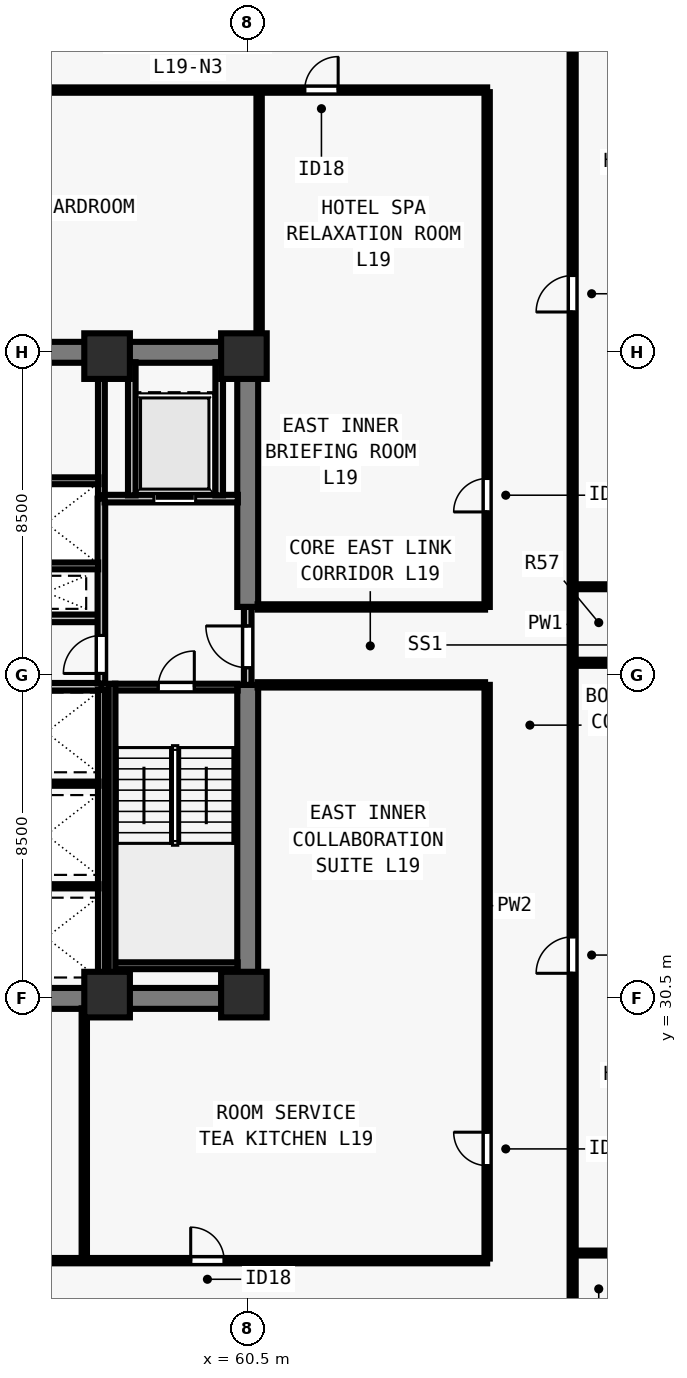
"""IFC4 building model, lengths in metres.
Left out: names, types, materials, properties, quantities, classifications, styles, units other than length and angle.
Written with IfcOpenShell. Run it as: python <this file> out.ifc"""

import sys

from ifc_helpers import new_model, si_unit, direction, frame, frame_2d, origin, origin_2d, place, context, subcontext, project, spatial, rectangle, extrude, element, fill, save


model = new_model("IFC4")
c1 = context("Model", 3, precision=1e-05, world=origin(), true_north=direction((0.0, 1.0)))
c2 = subcontext(c1, "Body", "Model", "MODEL_VIEW")
j1 = project(units=[si_unit("LENGTHUNIT", "METRE"), si_unit("PLANEANGLEUNIT", "RADIAN")], contexts=[c1])
p1 = place(None, origin())
s1 = spatial("IfcSite", under=j1, at=p1, CompositionType="ELEMENT")
p2 = place(p1, origin())
s2 = spatial("IfcBuilding", under=s1, at=p2, CompositionType="ELEMENT")
p3 = place(p2, frame((0.0, 0.0, 72.5)))
s3 = spatial("IfcBuildingStorey", under=s2, at=p3, CompositionType="ELEMENT", Elevation=72.5)
for number, where, z_axis, x_axis in (
    (1, (56.8, 30.6, 0.0), (0.0, 0.0, 1.0), (1.0, 0.0, 0.0)),
    (2, (60.4, 30.6, 0.0), (0.0, 0.0, 1.0), (1.0, 0.0, 0.0)),
    (3, (56.8, 47.4, 0.0), (0.0, 0.0, 1.0), (1.0, 0.0, 0.0)),
    (4, (60.4, 47.4, 0.0), (0.0, 0.0, 1.0), (1.0, 0.0, 0.0)),
):
    element("IfcColumn", number, at=place(p3, frame(where, z_axis=z_axis, x_axis=x_axis)), inside=s3, PredefinedType="COLUMN", context=c2, shape_type="SweptSolid", body=[
        extrude(rectangle(XDim=1.2, YDim=1.2, at=origin_2d()), origin(), (0.0, 0.0, 1.0), 3.5),
    ])
for number, where, z_axis, x_axis in (
    (5, (43.225, 30.5, 0.0), (0.0, 0.0, 1.0), (1.0, 0.0, 0.0)),
    (6, (43.225, 47.5, 0.0), (0.0, 0.0, 1.0), (1.0, 0.0, 0.0)),
):
    element("IfcWall", number, at=place(p3, frame(where, z_axis=z_axis, x_axis=x_axis)), inside=s3, PredefinedType="SHEAR", context=c2, shape_type="SweptSolid", body=[
        extrude(rectangle(XDim=17.55, YDim=0.55, at=frame_2d((8.775, 0.0))), origin(), (0.0, 0.0, 1.0), 3.28),
    ])
p4 = place(p3, frame((60.5, 30.765, 0.0), z_axis=(0.0, 0.0, 1.0), x_axis=(0.0, 1.0, 0.0)))
e7 = element("IfcWall", 7, at=p4, inside=s3, PredefinedType="SHEAR", context=c2, shape_type="SweptSolid", body=[
    extrude(rectangle(XDim=7.985, YDim=0.55, at=frame_2d((3.993, 0.0))), origin(), (0.0, 0.0, 1.0), 3.28),
])
p5 = place(p3, frame((60.5, 40.8, 0.0), z_axis=(0.0, 0.0, 1.0), x_axis=(0.0, 1.0, 0.0)))
e8 = element("IfcWall", 8, at=p5, inside=s3, PredefinedType="SHEAR", context=c2, shape_type="SweptSolid", body=[
    extrude(rectangle(XDim=6.435, YDim=0.55, at=frame_2d((3.218, 0.0))), origin(), (0.0, 0.0, 1.0), 3.28),
])
for number, where, z_axis, x_axis in (
    (9, (53.7, 38.7, 0.0), (0.0, 0.0, 1.0), (1.0, 0.0, 0.0)),
    (10, (53.7, 40.5, 0.0), (0.0, 0.0, 1.0), (1.0, 0.0, 0.0)),
):
    element("IfcWall", number, at=place(p3, frame(where, z_axis=z_axis, x_axis=x_axis)), inside=s3, PredefinedType="SOLIDWALL", context=c2, shape_type="SweptSolid", body=[
        extrude(rectangle(XDim=2.95, YDim=0.2, at=frame_2d((1.475, 0.0))), origin(), (0.0, 0.0, 1.0), 3.28),
    ])
p6 = place(p3, frame((60.5, 38.75, 0.0), z_axis=(0.0, 0.0, 1.0), x_axis=(0.0, 1.0, 0.0)))
e11 = element("IfcWall", 11, at=p6, inside=s3, PredefinedType="SOLIDWALL", context=c2, shape_type="SweptSolid", body=[
    extrude(rectangle(XDim=2.05, YDim=0.2, at=frame_2d((1.025, 0.0))), origin(), (0.0, 0.0, 1.0), 3.28),
])
p7 = place(p6, frame((0.45, 0.0, 0.0)))
e12 = element("IfcOpeningElement", 12, at=p7, cuts=e11, PredefinedType="OPENING", context=c2, shape_type="SweptSolid", body=[
    extrude(rectangle(XDim=1.1, YDim=2.15, at=frame_2d((0.55, 1.075))), frame((0.0, 0.11, 0.0), z_axis=(0.0, -1.0, 0.0), x_axis=(1.0, 0.0, 0.0)), (0.0, 0.0, 1.0), 0.22),
])
p8 = place(p3, frame((56.65, 38.785, 0.0), z_axis=(0.0, 0.0, 1.0), x_axis=(0.0, 1.0, 0.0)))
e13 = element("IfcWall", 13, at=p8, inside=s3, PredefinedType="SOLIDWALL", context=c2, shape_type="SweptSolid", body=[
    extrude(rectangle(XDim=4.865, YDim=0.2, at=frame_2d((2.433, 0.0))), origin(), (0.0, 0.0, 1.0), 3.28),
])
p9 = place(p8, frame((0.265, 0.0, 0.0)))
e14 = element("IfcOpeningElement", 14, at=p9, cuts=e13, PredefinedType="OPENING", context=c2, shape_type="SweptSolid", body=[
    extrude(rectangle(XDim=1.0, YDim=2.15, at=frame_2d((0.5, 1.075))), frame((0.0, 0.11, 0.0), z_axis=(0.0, -1.0, 0.0), x_axis=(1.0, 0.0, 0.0)), (0.0, 0.0, 1.0), 0.22),
])
p10 = place(p3, frame((56.735, 43.65, 0.0), z_axis=(0.0, 0.0, 1.0), x_axis=(1.0, 0.0, 0.0)))
e15 = element("IfcWall", 15, at=p10, inside=s3, PredefinedType="SOLIDWALL", context=c2, shape_type="SweptSolid", body=[
    extrude(rectangle(XDim=3.505, YDim=0.2, at=frame_2d((1.752, 0.0))), origin(), (0.0, 0.0, 1.0), 3.28),
])
p11 = place(p10, frame((1.295, 0.0, 0.0)))
e16 = element("IfcOpeningElement", 16, at=p11, cuts=e15, PredefinedType="OPENING", context=c2, shape_type="SweptSolid", body=[
    extrude(rectangle(XDim=1.1, YDim=2.2, at=frame_2d((0.55, 1.1))), frame((0.0, 0.11, 0.0), z_axis=(0.0, -1.0, 0.0), x_axis=(1.0, 0.0, 0.0)), (0.0, 0.0, 1.0), 0.22),
])
for number, where, z_axis, x_axis in (
    (17, (57.45, 43.735, 0.0), (0.0, 0.0, 1.0), (0.0, 1.0, 0.0)),
    (18, (59.75, 43.735, 0.0), (0.0, 0.0, 1.0), (0.0, 1.0, 0.0)),
):
    element("IfcWall", number, at=place(p3, frame(where, z_axis=z_axis, x_axis=x_axis)), inside=s3, PredefinedType="SOLIDWALL", context=c2, shape_type="SweptSolid", body=[
        extrude(rectangle(XDim=3.505, YDim=0.2, at=frame_2d((1.752, 0.0))), origin(), (0.0, 0.0, 1.0), 3.28),
    ])
p12 = place(p3, frame((56.65, 30.76, 0.0), z_axis=(0.0, 0.0, 1.0), x_axis=(0.0, 1.0, 0.0)))
e19 = element("IfcWall", 19, at=p12, inside=s3, PredefinedType="SOLIDWALL", context=c2, shape_type="SweptSolid", body=[
    extrude(rectangle(XDim=7.855, YDim=0.18, at=frame_2d((3.927, 0.0))), origin(), (0.0, 0.0, 1.0), 3.28),
])
for number, where, z_axis, x_axis in (
    (20, (53.785, 33.45, 0.0), (0.0, 0.0, 1.0), (1.0, 0.0, 0.0)),
    (21, (53.785, 36.15, 0.0), (0.0, 0.0, 1.0), (1.0, 0.0, 0.0)),
):
    element("IfcWall", number, at=place(p3, frame(where, z_axis=z_axis, x_axis=x_axis)), inside=s3, PredefinedType="PARTITIONING", context=c2, shape_type="SweptSolid", body=[
        extrude(rectangle(XDim=2.79, YDim=0.11, at=frame_2d((1.395, 0.0))), origin(), (0.0, 0.0, 1.0), 3.28),
    ])
p13 = place(p3, frame((56.65, 43.735, 0.0), z_axis=(0.0, 0.0, 1.0), x_axis=(0.0, 1.0, 0.0)))
e22 = element("IfcWall", 22, at=p13, inside=s3, PredefinedType="SOLIDWALL", context=c2, shape_type="SweptSolid", body=[
    extrude(rectangle(XDim=3.505, YDim=0.18, at=frame_2d((1.752, 0.0))), origin(), (0.0, 0.0, 1.0), 3.28),
])
p14 = place(p3, frame((53.785, 41.88, 0.0), z_axis=(0.0, 0.0, 1.0), x_axis=(1.0, 0.0, 0.0)))
e23 = element("IfcWall", 23, at=p14, inside=s3, PredefinedType="SOLIDWALL", context=c2, shape_type="SweptSolid", body=[
    extrude(rectangle(XDim=2.78, YDim=0.18, at=frame_2d((1.39, 0.0))), origin(), (0.0, 0.0, 1.0), 3.28),
])
p15 = place(p3, frame((53.785, 44.12, 0.0), z_axis=(0.0, 0.0, 1.0), x_axis=(1.0, 0.0, 0.0)))
e24 = element("IfcWall", 24, at=p15, inside=s3, PredefinedType="SOLIDWALL", context=c2, shape_type="SweptSolid", body=[
    extrude(rectangle(XDim=2.79, YDim=0.18, at=frame_2d((1.395, 0.0))), origin(), (0.0, 0.0, 1.0), 3.28),
])
p16 = place(p3, frame((69.05, 21.415, 0.0), z_axis=(0.0, 0.0, 1.0), x_axis=(0.0, 1.0, 0.0)))
e25 = element("IfcWall", 25, at=p16, inside=s3, PredefinedType="PARTITIONING", context=c2, shape_type="SweptSolid", body=[
    extrude(rectangle(XDim=35.17, YDim=0.16, at=frame_2d((17.585, 0.0))), origin(), (0.0, 0.0, 1.0), 3.28),
])
p17 = place(p16, frame((9.746, 0.0, 0.0)))
e26 = element("IfcOpeningElement", 26, at=p17, cuts=e25, PredefinedType="OPENING", context=c2, shape_type="SweptSolid", body=[
    extrude(rectangle(XDim=0.96, YDim=2.15, at=frame_2d((0.48, 1.075))), frame((0.0, 0.09, 0.0), z_axis=(0.0, -1.0, 0.0), x_axis=(1.0, 0.0, 0.0)), (0.0, 0.0, 1.0), 0.18),
])
p18 = place(p16, frame((27.146, 0.0, 0.0)))
e27 = element("IfcOpeningElement", 27, at=p18, cuts=e25, PredefinedType="OPENING", context=c2, shape_type="SweptSolid", body=[
    extrude(rectangle(XDim=0.96, YDim=2.15, at=frame_2d((0.48, 1.075))), frame((0.0, 0.09, 0.0), z_axis=(0.0, -1.0, 0.0), x_axis=(1.0, 0.0, 0.0)), (0.0, 0.0, 1.0), 0.18),
])
p19 = place(p3, frame((37.2, 23.6, 0.0), z_axis=(0.0, 0.0, 1.0), x_axis=(1.0, 0.0, 0.0)))
e28 = element("IfcWall", 28, at=p19, inside=s3, PredefinedType="PARTITIONING", context=c2, shape_type="SweptSolid", body=[
    extrude(rectangle(XDim=29.6, YDim=0.14, at=frame_2d((14.8, 0.0))), origin(), (0.0, 0.0, 1.0), 3.28),
])
p20 = place(p19, frame((1.2, 0.0, 0.0)))
e29 = element("IfcOpeningElement", 29, at=p20, cuts=e28, PredefinedType="OPENING", context=c2, shape_type="SweptSolid", body=[
    extrude(rectangle(XDim=0.88, YDim=2.1, at=frame_2d((0.44, 1.05))), frame((0.0, 0.08, 0.0), z_axis=(0.0, -1.0, 0.0), x_axis=(1.0, 0.0, 0.0)), (0.0, 0.0, 1.0), 0.16),
])
p21 = place(p19, frame((11.3, 0.0, 0.0)))
e30 = element("IfcOpeningElement", 30, at=p21, cuts=e28, PredefinedType="OPENING", context=c2, shape_type="SweptSolid", body=[
    extrude(rectangle(XDim=0.88, YDim=2.1, at=frame_2d((0.44, 1.05))), frame((0.0, 0.08, 0.0), z_axis=(0.0, -1.0, 0.0), x_axis=(1.0, 0.0, 0.0)), (0.0, 0.0, 1.0), 0.16),
])
p22 = place(p19, frame((21.8, 0.0, 0.0)))
e31 = element("IfcOpeningElement", 31, at=p22, cuts=e28, PredefinedType="OPENING", context=c2, shape_type="SweptSolid", body=[
    extrude(rectangle(XDim=0.88, YDim=2.1, at=frame_2d((0.44, 1.05))), frame((0.0, 0.08, 0.0), z_axis=(0.0, -1.0, 0.0), x_axis=(1.0, 0.0, 0.0)), (0.0, 0.0, 1.0), 0.16),
])
p23 = place(p3, frame((37.2, 54.4, 0.0), z_axis=(0.0, 0.0, 1.0), x_axis=(1.0, 0.0, 0.0)))
e32 = element("IfcWall", 32, at=p23, inside=s3, PredefinedType="PARTITIONING", context=c2, shape_type="SweptSolid", body=[
    extrude(rectangle(XDim=29.6, YDim=0.14, at=frame_2d((14.8, 0.0))), origin(), (0.0, 0.0, 1.0), 3.28),
])
p24 = place(p23, frame((2.2, 0.0, 0.0)))
e33 = element("IfcOpeningElement", 33, at=p24, cuts=e32, PredefinedType="OPENING", context=c2, shape_type="SweptSolid", body=[
    extrude(rectangle(XDim=0.88, YDim=2.1, at=frame_2d((0.44, 1.05))), frame((0.0, 0.08, 0.0), z_axis=(0.0, -1.0, 0.0), x_axis=(1.0, 0.0, 0.0)), (0.0, 0.0, 1.0), 0.16),
])
p25 = place(p23, frame((15.3, 0.0, 0.0)))
e34 = element("IfcOpeningElement", 34, at=p25, cuts=e32, PredefinedType="OPENING", context=c2, shape_type="SweptSolid", body=[
    extrude(rectangle(XDim=0.88, YDim=2.1, at=frame_2d((0.44, 1.05))), frame((0.0, 0.08, 0.0), z_axis=(0.0, -1.0, 0.0), x_axis=(1.0, 0.0, 0.0)), (0.0, 0.0, 1.0), 0.16),
])
p26 = place(p23, frame((24.8, 0.0, 0.0)))
e35 = element("IfcOpeningElement", 35, at=p26, cuts=e32, PredefinedType="OPENING", context=c2, shape_type="SweptSolid", body=[
    extrude(rectangle(XDim=0.88, YDim=2.1, at=frame_2d((0.44, 1.05))), frame((0.0, 0.08, 0.0), z_axis=(0.0, -1.0, 0.0), x_axis=(1.0, 0.0, 0.0)), (0.0, 0.0, 1.0), 0.16),
])
p27 = place(p3, frame((66.8, 23.655, 0.0), z_axis=(0.0, 0.0, 1.0), x_axis=(0.0, 1.0, 0.0)))
e36 = element("IfcWall", 36, at=p27, inside=s3, PredefinedType="PARTITIONING", context=c2, shape_type="SweptSolid", body=[
    extrude(rectangle(XDim=15.095, YDim=0.14, at=frame_2d((7.547, 0.0))), origin(), (0.0, 0.0, 1.0), 3.28),
])
p28 = place(p27, frame((2.445, 0.0, 0.0)))
e37 = element("IfcOpeningElement", 37, at=p28, cuts=e36, PredefinedType="OPENING", context=c2, shape_type="SweptSolid", body=[
    extrude(rectangle(XDim=0.88, YDim=2.1, at=frame_2d((0.44, 1.05))), frame((0.0, 0.08, 0.0), z_axis=(0.0, -1.0, 0.0), x_axis=(1.0, 0.0, 0.0)), (0.0, 0.0, 1.0), 0.16),
])
p29 = place(p3, frame((66.8, 40.8, 0.0), z_axis=(0.0, 0.0, 1.0), x_axis=(0.0, 1.0, 0.0)))
e38 = element("IfcWall", 38, at=p29, inside=s3, PredefinedType="PARTITIONING", context=c2, shape_type="SweptSolid", body=[
    extrude(rectangle(XDim=13.545, YDim=0.14, at=frame_2d((6.772, 0.0))), origin(), (0.0, 0.0, 1.0), 3.28),
])
p30 = place(p29, frame((2.5, 0.0, 0.0)))
e39 = element("IfcOpeningElement", 39, at=p30, cuts=e38, PredefinedType="OPENING", context=c2, shape_type="SweptSolid", body=[
    extrude(rectangle(XDim=0.88, YDim=2.1, at=frame_2d((0.44, 1.05))), frame((0.0, 0.08, 0.0), z_axis=(0.0, -1.0, 0.0), x_axis=(1.0, 0.0, 0.0)), (0.0, 0.0, 1.0), 0.16),
])
for number, where, z_axis, x_axis in (
    (40, (60.76, 38.75, 0.0), (0.0, 0.0, 1.0), (1.0, 0.0, 0.0)),
    (41, (60.76, 40.8, 0.0), (0.0, 0.0, 1.0), (1.0, 0.0, 0.0)),
):
    element("IfcWall", number, at=place(p3, frame(where, z_axis=z_axis, x_axis=x_axis)), inside=s3, PredefinedType="PARTITIONING", context=c2, shape_type="SweptSolid", body=[
        extrude(rectangle(XDim=5.985, YDim=0.14, at=frame_2d((2.993, 0.0))), origin(), (0.0, 0.0, 1.0), 3.28),
    ])
p31 = place(p3, frame((56.2, 23.655, 0.0), z_axis=(0.0, 0.0, 1.0), x_axis=(0.0, 1.0, 0.0)))
e42 = element("IfcWall", 42, at=p31, inside=s3, PredefinedType="PARTITIONING", context=c2, shape_type="SweptSolid", body=[
    extrude(rectangle(XDim=6.585, YDim=0.14, at=frame_2d((3.292, 0.0))), origin(), (0.0, 0.0, 1.0), 2.849),
])
p32 = place(p3, frame((60.8, 47.76, 0.0), z_axis=(0.0, 0.0, 1.0), x_axis=(0.0, 1.0, 0.0)))
e43 = element("IfcWall", 43, at=p32, inside=s3, PredefinedType="PARTITIONING", context=c2, shape_type="SweptSolid", body=[
    extrude(rectangle(XDim=6.585, YDim=0.14, at=frame_2d((3.292, 0.0))), origin(), (0.0, 0.0, 1.0), 2.439),
])
p33 = place(p3, frame((69.115, 23.8, 0.0), z_axis=(0.0, 0.0, 1.0), x_axis=(1.0, 0.0, 0.0)))
e44 = element("IfcWall", 44, at=p33, inside=s3, PredefinedType="PLUMBINGWALL", context=c2, shape_type="SweptSolid", body=[
    extrude(rectangle(XDim=2.235, YDim=0.13, at=frame_2d((1.118, 0.0))), origin(), (0.0, 0.0, 1.0), 3.28),
])
p34 = place(p3, frame((69.115, 39.332, 0.0), z_axis=(0.0, 0.0, 1.0), x_axis=(1.0, 0.0, 0.0)))
e45 = element("IfcWall", 45, at=p34, inside=s3, PredefinedType="PARTITIONING", context=c2, shape_type="SweptSolid", body=[
    extrude(rectangle(XDim=8.115, YDim=0.16, at=frame_2d((4.058, 0.0))), origin(), (0.0, 0.0, 1.0), 3.28),
])
p35 = place(p3, frame((69.115, 41.332, 0.0), z_axis=(0.0, 0.0, 1.0), x_axis=(1.0, 0.0, 0.0)))
e46 = element("IfcWall", 46, at=p35, inside=s3, PredefinedType="PLUMBINGWALL", context=c2, shape_type="SweptSolid", body=[
    extrude(rectangle(XDim=2.235, YDim=0.13, at=frame_2d((1.118, 0.0))), origin(), (0.0, 0.0, 1.0), 3.28),
])
p36 = place(p3, frame((57.005, 38.69, 0.0), z_axis=(0.0, 0.0, 1.0), x_axis=(1.0, 0.0, 0.0)))
e47 = element("IfcWall", 47, at=p36, inside=s3, PredefinedType="SOLIDWALL", context=c2, shape_type="SweptSolid", body=[
    extrude(rectangle(XDim=3.23, YDim=0.18, at=frame_2d((1.615, 0.0))), origin(), (0.0, 0.0, 1.0), 3.28),
])
p37 = place(p36, frame((1.14, 0.0, 0.0)))
e48 = element("IfcOpeningElement", 48, at=p37, cuts=e47, PredefinedType="OPENING", context=c2, shape_type="SweptSolid", body=[
    extrude(rectangle(XDim=0.95, YDim=2.15, at=frame_2d((0.475, 1.075))), frame((0.0, 0.1, 0.0), z_axis=(0.0, -1.0, 0.0), x_axis=(1.0, 0.0, 0.0)), (0.0, 0.0, 1.0), 0.2),
])
p38 = place(p3, frame((57.005, 31.36, 0.0), z_axis=(0.0, 0.0, 1.0), x_axis=(1.0, 0.0, 0.0)))
e49 = element("IfcWall", 49, at=p38, inside=s3, PredefinedType="SOLIDWALL", context=c2, shape_type="SweptSolid", body=[
    extrude(rectangle(XDim=3.23, YDim=0.18, at=frame_2d((1.615, 0.0))), origin(), (0.0, 0.0, 1.0), 3.28),
])
p39 = place(p3, frame((56.93, 38.78, 0.0), z_axis=(0.0, 0.0, 1.0), x_axis=(0.0, -1.0, 0.0)))
e50 = element("IfcWall", 50, at=p39, inside=s3, PredefinedType="SOLIDWALL", context=c2, shape_type="SweptSolid", body=[
    extrude(rectangle(XDim=8.017, YDim=0.18, at=frame_2d((4.009, 0.0))), origin(), (0.0, 0.0, 1.0), 3.28),
])
p40 = place(p7, origin())
e51 = element("IfcDoor", 51, at=p40, inside=s3, OperationType="SINGLE_SWING_RIGHT", PredefinedType="DOOR", context=c2, shape_type="SweptSolid", body=[
    extrude(rectangle(XDim=1.1, YDim=2.15, at=frame_2d((0.55, 1.075))), frame((0.0, 0.025, 0.0), z_axis=(0.0, -1.0, 0.0), x_axis=(1.0, 0.0, 0.0)), (0.0, 0.0, 1.0), 0.05),
])
fill(e12, e51)
p41 = place(p9, origin())
e52 = element("IfcDoor", 52, at=p41, inside=s3, OperationType="SINGLE_SWING_LEFT", PredefinedType="DOOR", context=c2, shape_type="SweptSolid", body=[
    extrude(rectangle(XDim=1.0, YDim=2.15, at=frame_2d((0.5, 1.075))), frame((0.0, 0.025, 0.0), z_axis=(0.0, -1.0, 0.0), x_axis=(1.0, 0.0, 0.0)), (0.0, 0.0, 1.0), 0.05),
])
fill(e14, e52)
p42 = place(p11, origin())
e53 = element("IfcDoor", 53, at=p42, inside=s3, OperationType="SLIDING_TO_LEFT", PredefinedType="DOOR", context=c2, shape_type="SweptSolid", body=[
    extrude(rectangle(XDim=1.1, YDim=2.2, at=frame_2d((0.55, 1.1))), frame((0.0, 0.025, 0.0), z_axis=(0.0, -1.0, 0.0), x_axis=(1.0, 0.0, 0.0)), (0.0, 0.0, 1.0), 0.05),
])
fill(e16, e53)
p43 = place(p22, origin())
e54 = element("IfcDoor", 54, at=p43, inside=s3, OperationType="SINGLE_SWING_LEFT", PredefinedType="DOOR", context=c2, shape_type="SweptSolid", body=[
    extrude(rectangle(XDim=0.88, YDim=2.1, at=frame_2d((0.44, 1.05))), frame((0.0, 0.025, 0.0), z_axis=(0.0, -1.0, 0.0), x_axis=(1.0, 0.0, 0.0)), (0.0, 0.0, 1.0), 0.05),
])
fill(e31, e54)
p44 = place(p26, origin())
e55 = element("IfcDoor", 55, at=p44, inside=s3, OperationType="SINGLE_SWING_RIGHT", PredefinedType="DOOR", context=c2, shape_type="SweptSolid", body=[
    extrude(rectangle(XDim=0.88, YDim=2.1, at=frame_2d((0.44, 1.05))), frame((0.0, 0.025, 0.0), z_axis=(0.0, -1.0, 0.0), x_axis=(1.0, 0.0, 0.0)), (0.0, 0.0, 1.0), 0.05),
])
fill(e35, e55)
p45 = place(p28, origin())
e56 = element("IfcDoor", 56, at=p45, inside=s3, OperationType="SINGLE_SWING_RIGHT", PredefinedType="DOOR", context=c2, shape_type="SweptSolid", body=[
    extrude(rectangle(XDim=0.88, YDim=2.1, at=frame_2d((0.44, 1.05))), frame((0.0, 0.025, 0.0), z_axis=(0.0, -1.0, 0.0), x_axis=(1.0, 0.0, 0.0)), (0.0, 0.0, 1.0), 0.05),
])
fill(e37, e56)
p46 = place(p30, origin())
e57 = element("IfcDoor", 57, at=p46, inside=s3, OperationType="SINGLE_SWING_LEFT", PredefinedType="DOOR", context=c2, shape_type="SweptSolid", body=[
    extrude(rectangle(XDim=0.88, YDim=2.1, at=frame_2d((0.44, 1.05))), frame((0.0, 0.025, 0.0), z_axis=(0.0, -1.0, 0.0), x_axis=(1.0, 0.0, 0.0)), (0.0, 0.0, 1.0), 0.05),
])
fill(e39, e57)
p47 = place(p17, origin())
e58 = element("IfcDoor", 58, at=p47, inside=s3, OperationType="SINGLE_SWING_LEFT", PredefinedType="DOOR", context=c2, shape_type="SweptSolid", body=[
    extrude(rectangle(XDim=0.96, YDim=2.15, at=frame_2d((0.48, 1.075))), frame((0.0, 0.025, 0.0), z_axis=(0.0, -1.0, 0.0), x_axis=(1.0, 0.0, 0.0)), (0.0, 0.0, 1.0), 0.05),
])
fill(e26, e58)
p48 = place(p18, origin())
e59 = element("IfcDoor", 59, at=p48, inside=s3, OperationType="SINGLE_SWING_LEFT", PredefinedType="DOOR", context=c2, shape_type="SweptSolid", body=[
    extrude(rectangle(XDim=0.96, YDim=2.15, at=frame_2d((0.48, 1.075))), frame((0.0, 0.025, 0.0), z_axis=(0.0, -1.0, 0.0), x_axis=(1.0, 0.0, 0.0)), (0.0, 0.0, 1.0), 0.05),
])
fill(e27, e59)
p49 = place(p37, origin())
e60 = element("IfcDoor", 60, at=p49, inside=s3, OperationType="SINGLE_SWING_RIGHT", PredefinedType="DOOR", context=c2, shape_type="SweptSolid", body=[
    extrude(rectangle(XDim=0.95, YDim=2.15, at=frame_2d((0.475, 1.075))), frame((0.0, 0.025, 0.0), z_axis=(0.0, -1.0, 0.0), x_axis=(1.0, 0.0, 0.0)), (0.0, 0.0, 1.0), 0.05),
])
fill(e48, e60)
save(model, sys.argv[1])
